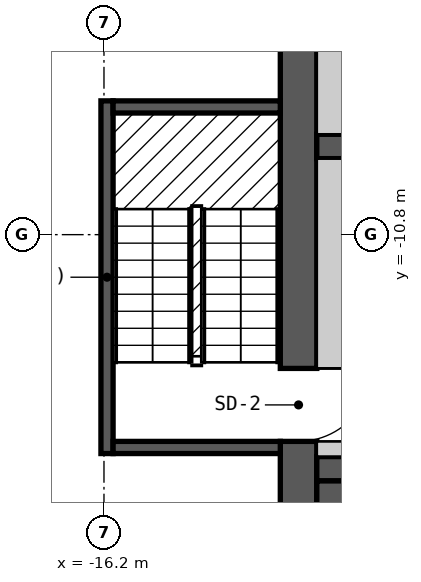
"""IFC4 building model, lengths in metres.
Left out: names, types, materials, properties, quantities, classifications, styles, units other than length and angle.
Written with IfcOpenShell. Run it as: python <this file> out.ifc"""

import sys

from ifc_helpers import new_model, si_unit, direction, frame, frame_2d, origin, origin_2d, place, context, subcontext, project, spatial, polyline, rectangle, outline, extrude, element, fill, save


model = new_model("IFC4")
c1 = context("Model", 3, precision=1e-05, world=origin(), true_north=direction((0.0, 1.0)))
c2 = subcontext(c1, "Body", "Model", "MODEL_VIEW")
j1 = project(units=[si_unit("LENGTHUNIT", "METRE"), si_unit("PLANEANGLEUNIT", "RADIAN")], contexts=[c1])
p1 = place(None, origin())
s1 = spatial("IfcSite", under=j1, at=p1, CompositionType="ELEMENT")
p2 = place(p1, origin())
s2 = spatial("IfcBuilding", under=s1, at=p2, CompositionType="ELEMENT")
p3 = place(p2, frame((0.0, 0.0, 199.2)))
s3 = spatial("IfcBuildingStorey", under=s2, at=p3, CompositionType="ELEMENT", Elevation=199.2)
p4 = place(p3, frame((-17.53, -15.736, 0.0), z_axis=(0.0, 0.0, 1.0), x_axis=(0.5, -0.866025403784, 0.0)))
e1 = element("IfcColumn", 1, at=p4, inside=s3, PredefinedType="COLUMN", context=c2, shape_type="SweptSolid", body=[
    extrude(rectangle(XDim=0.8, YDim=0.8, at=origin_2d()), origin(), (0.0, 0.0, 1.0), 3.6),
])
p5 = place(p3, frame((-13.0, -18.4, 0.0), z_axis=(0.0, 0.0, 1.0), x_axis=(0.0, 1.0, 0.0)))
e2 = element("IfcWall", 2, at=p5, inside=s3, PredefinedType="SHEAR", context=c2, shape_type="SweptSolid", body=[
    extrude(rectangle(XDim=12.8, YDim=0.6, at=frame_2d((6.4, 0.0))), origin(), (0.0, 0.0, 1.0), 2.6),
])
p6 = place(p5, frame((4.2, 0.0, 0.0)))
e3 = element("IfcOpeningElement", 3, at=p6, cuts=e2, PredefinedType="OPENING", context=c2, shape_type="SweptSolid", body=[
    extrude(rectangle(XDim=1.2, YDim=2.1, at=frame_2d((0.6, 1.05))), frame((0.0, 0.31, 0.0), z_axis=(0.0, -1.0, 0.0), x_axis=(1.0, 0.0, 0.0)), (0.0, 0.0, 1.0), 0.62),
])
p7 = place(p3, frame((-12.7, -14.65, 0.0), z_axis=(0.0, 0.0, 1.0), x_axis=(1.0, 0.0, 0.0)))
e4 = element("IfcWall", 4, at=p7, inside=s3, PredefinedType="SHEAR", context=c2, shape_type="SweptSolid", body=[
    extrude(rectangle(XDim=25.4, YDim=0.4, at=frame_2d((12.7, 0.0))), origin(), (0.0, 0.0, 1.0), 2.6),
])
p8 = place(p7, frame((1.9, 0.0, 0.0), z_axis=(0.0, 0.0, 1.0), x_axis=(-1.0, 0.0, 0.0)))
e5 = element("IfcOpeningElement", 5, at=p8, cuts=e4, PredefinedType="OPENING", context=c2, shape_type="SweptSolid", body=[
    extrude(rectangle(XDim=1.2, YDim=2.1, at=frame_2d((0.6, 1.05))), frame((0.0, 0.21, 0.0), z_axis=(0.0, -1.0, 0.0), x_axis=(1.0, 0.0, 0.0)), (0.0, 0.0, 1.0), 0.42),
])
p9 = place(p7, frame((24.75, 0.0, 0.0), z_axis=(0.0, 0.0, 1.0), x_axis=(-1.0, 0.0, 0.0)))
e6 = element("IfcOpeningElement", 6, at=p9, cuts=e4, PredefinedType="OPENING", context=c2, shape_type="SweptSolid", body=[
    extrude(rectangle(XDim=1.2, YDim=2.1, at=frame_2d((0.6, 1.05))), frame((0.0, 0.21, 0.0), z_axis=(0.0, -1.0, 0.0), x_axis=(1.0, 0.0, 0.0)), (0.0, 0.0, 1.0), 0.42),
])
p10 = place(p7, frame((8.8, 0.0, 0.0), z_axis=(0.0, 0.0, 1.0), x_axis=(-1.0, 0.0, 0.0)))
e7 = element("IfcOpeningElement", 7, at=p10, cuts=e4, PredefinedType="OPENING", context=c2, shape_type="SweptSolid", body=[
    extrude(rectangle(XDim=1.0, YDim=2.1, at=frame_2d((0.5, 1.05))), frame((0.0, 0.21, 0.0), z_axis=(0.0, -1.0, 0.0), x_axis=(1.0, 0.0, 0.0)), (0.0, 0.0, 1.0), 0.42),
])
p11 = place(p7, frame((12.9, 0.0, 0.0), z_axis=(0.0, 0.0, 1.0), x_axis=(-1.0, 0.0, 0.0)))
e8 = element("IfcOpeningElement", 8, at=p11, cuts=e4, PredefinedType="OPENING", context=c2, shape_type="SweptSolid", body=[
    extrude(rectangle(XDim=1.0, YDim=2.1, at=frame_2d((0.5, 1.05))), frame((0.0, 0.21, 0.0), z_axis=(0.0, -1.0, 0.0), x_axis=(1.0, 0.0, 0.0)), (0.0, 0.0, 1.0), 0.42),
])
p12 = place(p7, frame((17.3, 0.0, 0.0), z_axis=(0.0, 0.0, 1.0), x_axis=(-1.0, 0.0, 0.0)))
e9 = element("IfcOpeningElement", 9, at=p12, cuts=e4, PredefinedType="OPENING", context=c2, shape_type="SweptSolid", body=[
    extrude(rectangle(XDim=1.0, YDim=2.1, at=frame_2d((0.5, 1.05))), frame((0.0, 0.21, 0.0), z_axis=(0.0, -1.0, 0.0), x_axis=(1.0, 0.0, 0.0)), (0.0, 0.0, 1.0), 0.42),
])
p13 = place(p3, frame((-12.7, -9.35, 0.0), z_axis=(0.0, 0.0, 1.0), x_axis=(1.0, 0.0, 0.0)))
e10 = element("IfcWall", 10, at=p13, inside=s3, PredefinedType="SHEAR", context=c2, shape_type="SweptSolid", body=[
    extrude(rectangle(XDim=22.9, YDim=0.4, at=frame_2d((11.45, 0.0))), origin(), (0.0, 0.0, 1.0), 2.6),
])
p14 = place(p13, frame((1.3, 0.0, 0.0)))
e11 = element("IfcOpeningElement", 11, at=p14, cuts=e10, PredefinedType="OPENING", context=c2, shape_type="SweptSolid", body=[
    extrude(rectangle(XDim=1.1, YDim=2.1, at=frame_2d((0.55, 1.05))), frame((0.0, 0.21, 0.0), z_axis=(0.0, -1.0, 0.0), x_axis=(1.0, 0.0, 0.0)), (0.0, 0.0, 1.0), 0.42),
])
p15 = place(p13, frame((4.1, 0.0, 0.0)))
e12 = element("IfcOpeningElement", 12, at=p15, cuts=e10, PredefinedType="OPENING", context=c2, shape_type="SweptSolid", body=[
    extrude(rectangle(XDim=1.1, YDim=2.1, at=frame_2d((0.55, 1.05))), frame((0.0, 0.21, 0.0), z_axis=(0.0, -1.0, 0.0), x_axis=(1.0, 0.0, 0.0)), (0.0, 0.0, 1.0), 0.42),
])
p16 = place(p13, frame((20.8, 0.0, 0.0)))
e13 = element("IfcOpeningElement", 13, at=p16, cuts=e10, PredefinedType="OPENING", context=c2, shape_type="SweptSolid", body=[
    extrude(rectangle(XDim=1.1, YDim=2.1, at=frame_2d((0.55, 1.05))), frame((0.0, 0.21, 0.0), z_axis=(0.0, -1.0, 0.0), x_axis=(1.0, 0.0, 0.0)), (0.0, 0.0, 1.0), 0.42),
])
p17 = place(p3, frame((-26.024, -3.025, 0.0), z_axis=(0.0, 0.0, 1.0), x_axis=(0.500018670445, -0.86601462413, 0.0)))
e14 = element("IfcWall", 14, at=p17, inside=s3, PredefinedType="SOLIDWALL", context=c2, shape_type="SweptSolid", body=[
    extrude(outline(polyline([(0.0, -0.15), (20.785, -0.15), (20.705, 0.15), (0.08, 0.15), (0.0, -0.15)])), origin(), (0.0, 0.0, 1.0), 2.6),
])
p18 = place(p3, frame((-16.15, -14.4, 0.0), z_axis=(0.0, 0.0, 1.0), x_axis=(0.0, 1.0, 0.0)))
e15 = element("IfcWall", 15, at=p18, inside=s3, PredefinedType="SOLIDWALL", context=c2, shape_type="SweptSolid", body=[
    extrude(rectangle(XDim=5.8, YDim=0.2, at=frame_2d((2.9, 0.0))), origin(), (0.0, 0.0, 1.0), 2.6),
])
for number, where, z_axis, x_axis in (
    (16, (-16.05, -14.3, 0.0), (0.0, 0.0, 1.0), (1.0, 0.0, 0.0)),
    (17, (-16.05, -8.7, 0.0), (0.0, 0.0, 1.0), (1.0, 0.0, 0.0)),
):
    element("IfcWall", number, at=place(p3, frame(where, z_axis=z_axis, x_axis=x_axis)), inside=s3, PredefinedType="SOLIDWALL", context=c2, shape_type="SweptSolid", body=[
        extrude(rectangle(XDim=2.75, YDim=0.2, at=frame_2d((1.375, 0.0))), origin(), (0.0, 0.0, 1.0), 2.6),
    ])
p19 = place(p3, frame((-12.4, -18.4, 0.0), z_axis=(0.0, 0.0, 1.0), x_axis=(0.0, 1.0, 0.0)))
e18 = element("IfcWall", 18, at=p19, inside=s3, PredefinedType="SOLIDWALL", context=c2, shape_type="SweptSolid", body=[
    extrude(rectangle(XDim=3.55, YDim=0.6, at=frame_2d((1.775, 0.0))), origin(), (0.0, 0.0, 1.0), 2.6),
])
p20 = place(p3, frame((-12.7, -14.325, 0.0), z_axis=(0.0, 0.0, 1.0), x_axis=(1.0, 0.0, 0.0)))
e19 = element("IfcWall", 19, at=p20, inside=s3, PredefinedType="PARTITIONING", context=c2, shape_type="SweptSolid", body=[
    extrude(rectangle(XDim=0.6, YDim=0.25, at=frame_2d((0.3, 0.0))), origin(), (0.0, 0.0, 1.0), 2.6),
])
p21 = place(p3, frame((-12.4, -13.0, 0.0), z_axis=(0.0, 0.0, 1.0), x_axis=(0.0, 1.0, 0.0)))
e20 = element("IfcWall", 20, at=p21, inside=s3, PredefinedType="PARTITIONING", context=c2, shape_type="SweptSolid", body=[
    extrude(rectangle(XDim=3.45, YDim=0.6, at=frame_2d((1.725, 0.0))), origin(), (0.0, 0.0, 1.0), 2.6),
])
p22 = place(p3, frame((-12.4, -9.15, 0.0), z_axis=(0.0, 0.0, 1.0), x_axis=(0.0, 1.0, 0.0)))
e21 = element("IfcWall", 21, at=p22, inside=s3, PredefinedType="SOLIDWALL", context=c2, shape_type="SweptSolid", body=[
    extrude(rectangle(XDim=3.55, YDim=0.6, at=frame_2d((1.775, 0.0))), origin(), (0.0, 0.0, 1.0), 2.6),
])
p23 = place(p6, origin())
e22 = element("IfcDoor", 22, at=p23, inside=s3, OperationType="SINGLE_SWING_RIGHT", PredefinedType="DOOR", context=c2, shape_type="SweptSolid", body=[
    extrude(rectangle(XDim=1.2, YDim=2.1, at=frame_2d((0.6, 1.05))), frame((0.0, 0.025, 0.0), z_axis=(0.0, -1.0, 0.0), x_axis=(1.0, 0.0, 0.0)), (0.0, 0.0, 1.0), 0.05),
])
fill(e3, e22)
save(model, sys.argv[1])
